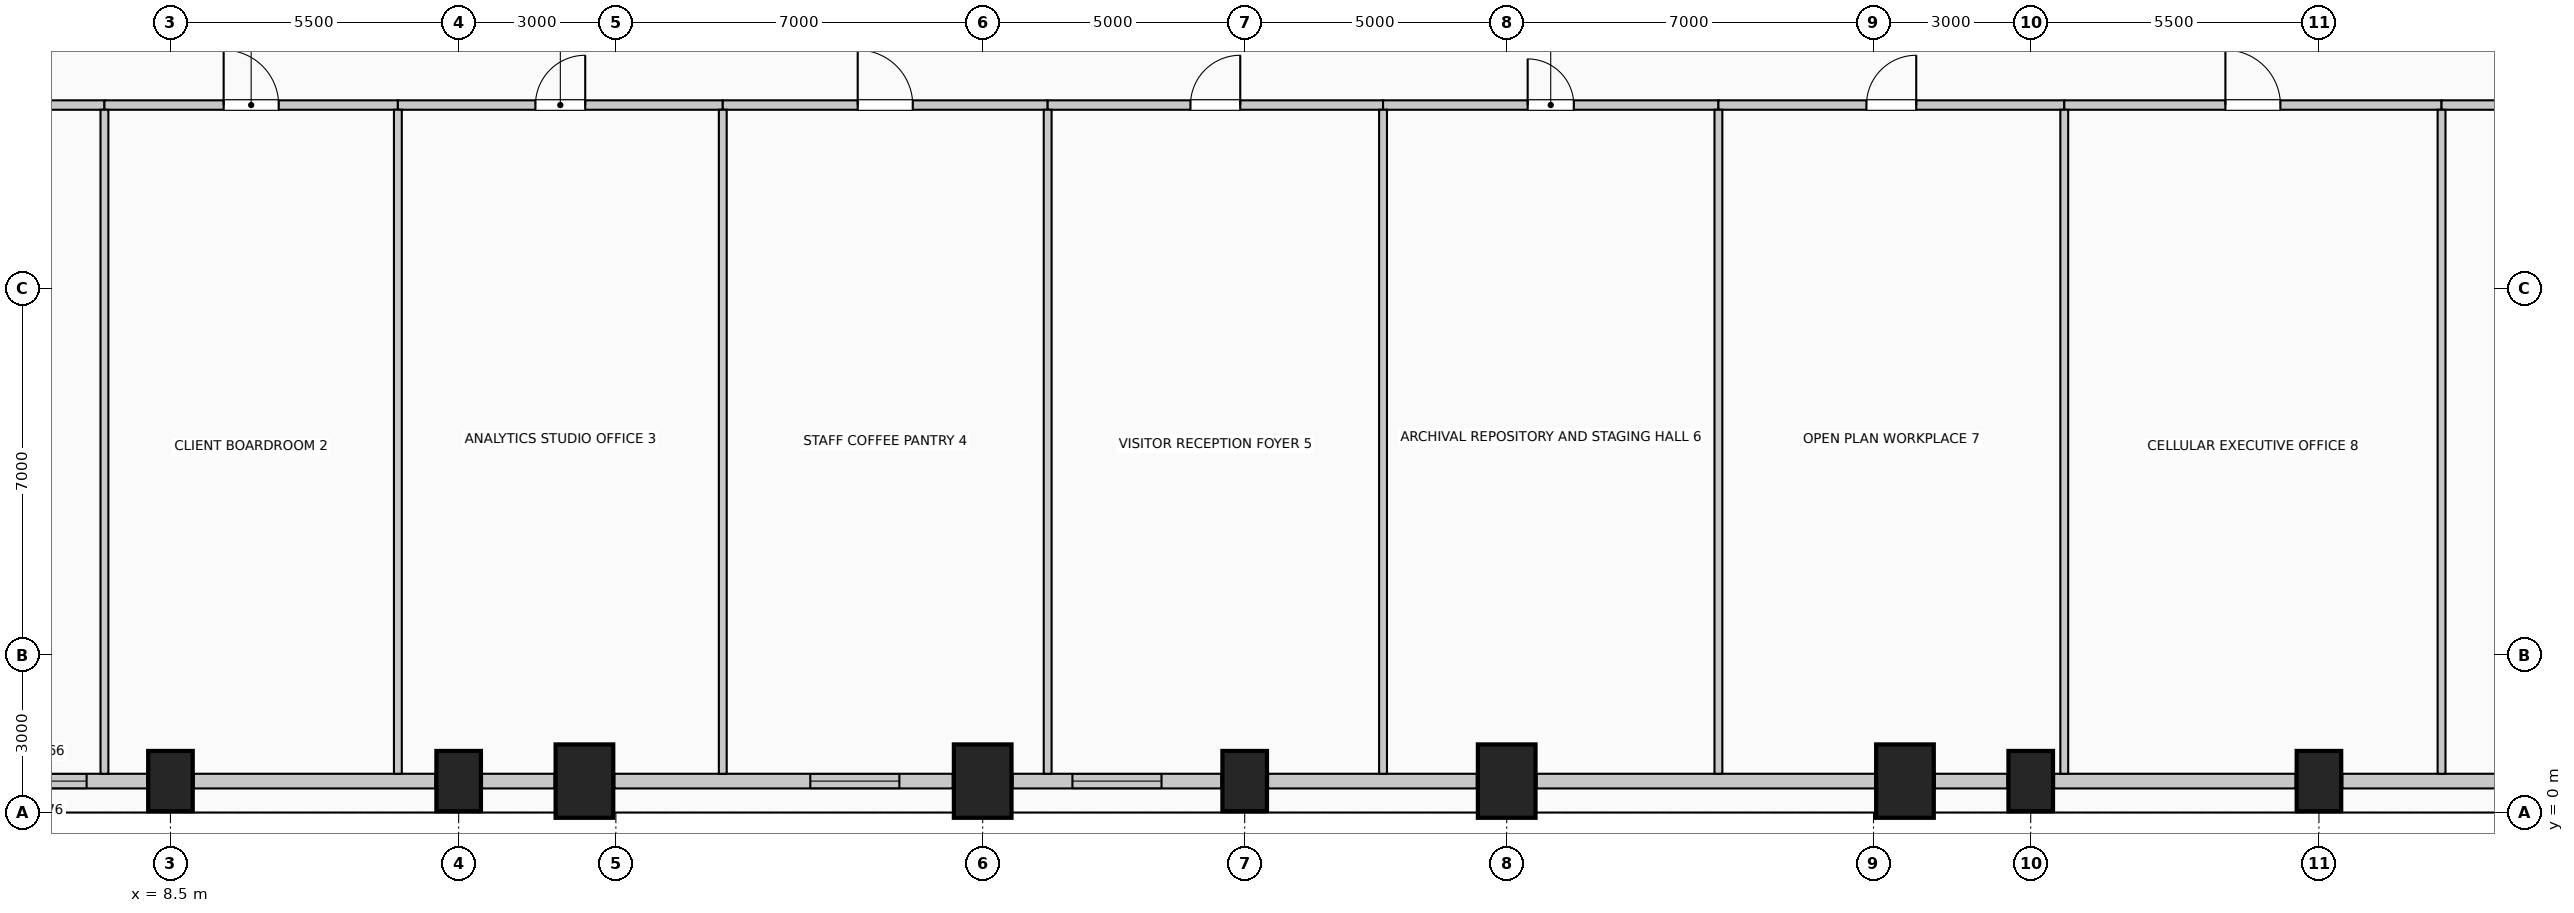
"""IFC4 building model, lengths in metres.
Left out: names, types, materials, properties, quantities, classifications, styles, units other than length and angle.
Written with IfcOpenShell. Run it as: python <this file> out.ifc"""

import sys

from ifc_helpers import new_model, si_unit, direction, frame, frame_2d, origin, origin_2d, place, context, subcontext, project, spatial, rectangle, extrude, element, fill, save


model = new_model("IFC4")
c1 = context("Model", 3, precision=1e-05, world=origin(), true_north=direction((0.0, 1.0)))
c2 = subcontext(c1, "Body", "Model", "MODEL_VIEW")
j1 = project(units=[si_unit("LENGTHUNIT", "METRE"), si_unit("PLANEANGLEUNIT", "RADIAN")], contexts=[c1])
p1 = place(None, origin())
s1 = spatial("IfcSite", under=j1, at=p1, CompositionType="ELEMENT")
p2 = place(p1, origin())
s2 = spatial("IfcBuilding", under=s1, at=p2, CompositionType="ELEMENT")
p3 = place(p2, frame((0.0, 0.0, 152.6)))
s3 = spatial("IfcBuildingStorey", under=s2, at=p3, CompositionType="ELEMENT", Elevation=152.6)
for number, where, z_axis, x_axis in (
    (1, (8.5, 0.6, 0.0), (0.0, 0.0, 1.0), (1.0, 0.0, 0.0)),
    (2, (14.0, 0.6, 0.0), (0.0, 0.0, 1.0), (1.0, 0.0, 0.0)),
):
    element("IfcColumn", number, at=place(p3, frame(where, z_axis=z_axis, x_axis=x_axis)), inside=s3, PredefinedType="COLUMN", context=c2, shape_type="SweptSolid", body=[
        extrude(rectangle(XDim=0.85, YDim=1.15, at=origin_2d()), origin(), (0.0, 0.0, 1.0), 4.0),
    ])
for number, where, z_axis, x_axis in (
    (3, (16.4, 0.6, 0.0), (0.0, 0.0, 1.0), (1.0, 0.0, 0.0)),
    (4, (24.0, 0.6, 0.0), (0.0, 0.0, 1.0), (1.0, 0.0, 0.0)),
):
    element("IfcColumn", number, at=place(p3, frame(where, z_axis=z_axis, x_axis=x_axis)), inside=s3, PredefinedType="COLUMN", context=c2, shape_type="SweptSolid", body=[
        extrude(rectangle(XDim=1.1, YDim=1.4, at=origin_2d()), origin(), (0.0, 0.0, 1.0), 4.0),
    ])
p4 = place(p3, frame((29.0, 0.6, 0.0), z_axis=(0.0, 0.0, 1.0), x_axis=(1.0, 0.0, 0.0)))
e5 = element("IfcColumn", 5, at=p4, inside=s3, PredefinedType="COLUMN", context=c2, shape_type="SweptSolid", body=[
    extrude(rectangle(XDim=0.85, YDim=1.15, at=origin_2d()), origin(), (0.0, 0.0, 1.0), 4.0),
])
for number, where, z_axis, x_axis in (
    (6, (34.0, 0.6, 0.0), (0.0, 0.0, 1.0), (1.0, 0.0, 0.0)),
    (7, (41.6, 0.6, 0.0), (0.0, 0.0, 1.0), (1.0, 0.0, 0.0)),
):
    element("IfcColumn", number, at=place(p3, frame(where, z_axis=z_axis, x_axis=x_axis)), inside=s3, PredefinedType="COLUMN", context=c2, shape_type="SweptSolid", body=[
        extrude(rectangle(XDim=1.1, YDim=1.4, at=origin_2d()), origin(), (0.0, 0.0, 1.0), 4.0),
    ])
for number, where, z_axis, x_axis in (
    (8, (44.0, 0.6, 0.0), (0.0, 0.0, 1.0), (1.0, 0.0, 0.0)),
    (9, (49.5, 0.6, 0.0), (0.0, 0.0, 1.0), (1.0, 0.0, 0.0)),
):
    element("IfcColumn", number, at=place(p3, frame(where, z_axis=z_axis, x_axis=x_axis)), inside=s3, PredefinedType="COLUMN", context=c2, shape_type="SweptSolid", body=[
        extrude(rectangle(XDim=0.85, YDim=1.15, at=origin_2d()), origin(), (0.0, 0.0, 1.0), 4.0),
    ])
p5 = place(p3, frame((8.055, 0.6, 0.0), z_axis=(0.0, 0.0, 1.0), x_axis=(-1.0, 0.0, 0.0)))
e10 = element("IfcWall", 10, at=p5, inside=s3, PredefinedType="SOLIDWALL", context=c2, shape_type="SweptSolid", body=[
    extrude(rectangle(XDim=4.01, YDim=0.28, at=frame_2d((2.005, 0.0))), origin(), (0.0, 0.0, 1.0), 2.875),
])
p6 = place(p5, frame((1.155, 0.0, 0.5)))
e11 = element("IfcOpeningElement", 11, at=p6, cuts=e10, PredefinedType="OPENING", context=c2, shape_type="SweptSolid", body=[
    extrude(rectangle(XDim=1.7, YDim=1.95, at=frame_2d((0.85, 0.975))), frame((0.0, 0.15, 0.0), z_axis=(0.0, -1.0, 0.0), x_axis=(1.0, 0.0, 0.0)), (0.0, 0.0, 1.0), 0.3),
])
p7 = place(p3, frame((13.555, 0.6, 0.0), z_axis=(0.0, 0.0, 1.0), x_axis=(-1.0, 0.0, 0.0)))
e12 = element("IfcWall", 12, at=p7, inside=s3, PredefinedType="SOLIDWALL", context=c2, shape_type="SweptSolid", body=[
    extrude(rectangle(XDim=4.61, YDim=0.28, at=frame_2d((2.305, 0.0))), origin(), (0.0, 0.0, 1.0), 2.875),
])
p8 = place(p3, frame((15.83, 0.6, 0.0), z_axis=(0.0, 0.0, 1.0), x_axis=(-1.0, 0.0, 0.0)))
e13 = element("IfcWall", 13, at=p8, inside=s3, PredefinedType="SOLIDWALL", context=c2, shape_type="SweptSolid", body=[
    extrude(rectangle(XDim=1.385, YDim=0.28, at=frame_2d((0.692, 0.0))), origin(), (0.0, 0.0, 1.0), 2.875),
])
p9 = place(p3, frame((23.43, 0.6, 0.0), z_axis=(0.0, 0.0, 1.0), x_axis=(-1.0, 0.0, 0.0)))
e14 = element("IfcWall", 14, at=p9, inside=s3, PredefinedType="SOLIDWALL", context=c2, shape_type="SweptSolid", body=[
    extrude(rectangle(XDim=6.46, YDim=0.28, at=frame_2d((3.23, 0.0))), origin(), (0.0, 0.0, 1.0), 2.875),
])
p10 = place(p9, frame((1.02, 0.0, 0.5)))
e15 = element("IfcOpeningElement", 15, at=p10, cuts=e14, PredefinedType="OPENING", context=c2, shape_type="SweptSolid", body=[
    extrude(rectangle(XDim=1.7, YDim=1.95, at=frame_2d((0.85, 0.975))), frame((0.0, 0.15, 0.0), z_axis=(0.0, -1.0, 0.0), x_axis=(1.0, 0.0, 0.0)), (0.0, 0.0, 1.0), 0.3),
])
p11 = place(p3, frame((28.555, 0.6, 0.0), z_axis=(0.0, 0.0, 1.0), x_axis=(-1.0, 0.0, 0.0)))
e16 = element("IfcWall", 16, at=p11, inside=s3, PredefinedType="SOLIDWALL", context=c2, shape_type="SweptSolid", body=[
    extrude(rectangle(XDim=3.985, YDim=0.28, at=frame_2d((1.992, 0.0))), origin(), (0.0, 0.0, 1.0), 2.875),
])
p12 = place(p11, frame((1.143, 0.0, 0.5)))
e17 = element("IfcOpeningElement", 17, at=p12, cuts=e16, PredefinedType="OPENING", context=c2, shape_type="SweptSolid", body=[
    extrude(rectangle(XDim=1.7, YDim=1.95, at=frame_2d((0.85, 0.975))), frame((0.0, 0.15, 0.0), z_axis=(0.0, -1.0, 0.0), x_axis=(1.0, 0.0, 0.0)), (0.0, 0.0, 1.0), 0.3),
])
p13 = place(p3, frame((33.43, 0.6, 0.0), z_axis=(0.0, 0.0, 1.0), x_axis=(-1.0, 0.0, 0.0)))
e18 = element("IfcWall", 18, at=p13, inside=s3, PredefinedType="SOLIDWALL", context=c2, shape_type="SweptSolid", body=[
    extrude(rectangle(XDim=3.985, YDim=0.28, at=frame_2d((1.992, 0.0))), origin(), (0.0, 0.0, 1.0), 2.875),
])
p14 = place(p3, frame((41.03, 0.6, 0.0), z_axis=(0.0, 0.0, 1.0), x_axis=(-1.0, 0.0, 0.0)))
e19 = element("IfcWall", 19, at=p14, inside=s3, PredefinedType="SOLIDWALL", context=c2, shape_type="SweptSolid", body=[
    extrude(rectangle(XDim=6.46, YDim=0.28, at=frame_2d((3.23, 0.0))), origin(), (0.0, 0.0, 1.0), 2.875),
])
p15 = place(p3, frame((43.555, 0.6, 0.0), z_axis=(0.0, 0.0, 1.0), x_axis=(-1.0, 0.0, 0.0)))
e20 = element("IfcWall", 20, at=p15, inside=s3, PredefinedType="SOLIDWALL", context=c2, shape_type="SweptSolid", body=[
    extrude(rectangle(XDim=1.385, YDim=0.28, at=frame_2d((0.692, 0.0))), origin(), (0.0, 0.0, 1.0), 2.875),
])
p16 = place(p3, frame((49.055, 0.6, 0.0), z_axis=(0.0, 0.0, 1.0), x_axis=(-1.0, 0.0, 0.0)))
e21 = element("IfcWall", 21, at=p16, inside=s3, PredefinedType="SOLIDWALL", context=c2, shape_type="SweptSolid", body=[
    extrude(rectangle(XDim=4.61, YDim=0.28, at=frame_2d((2.305, 0.0))), origin(), (0.0, 0.0, 1.0), 2.875),
])
p17 = place(p3, frame((53.955, 0.6, 0.0), z_axis=(0.0, 0.0, 1.0), x_axis=(-1.0, 0.0, 0.0)))
e22 = element("IfcWall", 22, at=p17, inside=s3, PredefinedType="SOLIDWALL", context=c2, shape_type="SweptSolid", body=[
    extrude(rectangle(XDim=4.01, YDim=0.28, at=frame_2d((2.005, 0.0))), origin(), (0.0, 0.0, 1.0), 2.875),
])
p18 = place(p3, frame((0.74, 13.5, 0.0), z_axis=(0.0, 0.0, 1.0), x_axis=(1.0, 0.0, 0.0)))
e23 = element("IfcWall", 23, at=p18, inside=s3, PredefinedType="PARTITIONING", context=c2, shape_type="SweptSolid", body=[
    extrude(rectangle(XDim=6.5, YDim=0.18, at=frame_2d((3.25, 0.0))), origin(), (0.0, 0.0, 1.0), 3.725),
])
p19 = place(p18, frame((2.775, 0.0, 0.0)))
e24 = element("IfcOpeningElement", 24, at=p19, cuts=e23, PredefinedType="OPENING", context=c2, shape_type="SweptSolid", body=[
    extrude(rectangle(XDim=0.95, YDim=2.15, at=frame_2d((0.475, 1.075))), frame((0.0, 0.1, 0.0), z_axis=(0.0, -1.0, 0.0), x_axis=(1.0, 0.0, 0.0)), (0.0, 0.0, 1.0), 0.2),
])
p20 = place(p3, frame((7.24, 13.5, 0.0), z_axis=(0.0, 0.0, 1.0), x_axis=(1.0, 0.0, 0.0)))
e25 = element("IfcWall", 25, at=p20, inside=s3, PredefinedType="PARTITIONING", context=c2, shape_type="SweptSolid", body=[
    extrude(rectangle(XDim=5.6, YDim=0.18, at=frame_2d((2.8, 0.0))), origin(), (0.0, 0.0, 1.0), 3.725),
])
p21 = place(p20, frame((2.275, 0.0, 0.0)))
e26 = element("IfcOpeningElement", 26, at=p21, cuts=e25, PredefinedType="OPENING", context=c2, shape_type="SweptSolid", body=[
    extrude(rectangle(XDim=1.05, YDim=2.15, at=frame_2d((0.525, 1.075))), frame((0.0, 0.1, 0.0), z_axis=(0.0, -1.0, 0.0), x_axis=(1.0, 0.0, 0.0)), (0.0, 0.0, 1.0), 0.2),
])
p22 = place(p3, frame((12.84, 13.5, 0.0), z_axis=(0.0, 0.0, 1.0), x_axis=(1.0, 0.0, 0.0)))
e27 = element("IfcWall", 27, at=p22, inside=s3, PredefinedType="PARTITIONING", context=c2, shape_type="SweptSolid", body=[
    extrude(rectangle(XDim=6.2, YDim=0.18, at=frame_2d((3.1, 0.0))), origin(), (0.0, 0.0, 1.0), 3.725),
])
p23 = place(p22, frame((2.625, 0.0, 0.0)))
e28 = element("IfcOpeningElement", 28, at=p23, cuts=e27, PredefinedType="OPENING", context=c2, shape_type="SweptSolid", body=[
    extrude(rectangle(XDim=0.95, YDim=2.15, at=frame_2d((0.475, 1.075))), frame((0.0, 0.1, 0.0), z_axis=(0.0, -1.0, 0.0), x_axis=(1.0, 0.0, 0.0)), (0.0, 0.0, 1.0), 0.2),
])
p24 = place(p3, frame((19.04, 13.5, 0.0), z_axis=(0.0, 0.0, 1.0), x_axis=(1.0, 0.0, 0.0)))
e29 = element("IfcWall", 29, at=p24, inside=s3, PredefinedType="PARTITIONING", context=c2, shape_type="SweptSolid", body=[
    extrude(rectangle(XDim=6.2, YDim=0.18, at=frame_2d((3.1, 0.0))), origin(), (0.0, 0.0, 1.0), 3.725),
])
p25 = place(p24, frame((2.575, 0.0, 0.0)))
e30 = element("IfcOpeningElement", 30, at=p25, cuts=e29, PredefinedType="OPENING", context=c2, shape_type="SweptSolid", body=[
    extrude(rectangle(XDim=1.05, YDim=2.15, at=frame_2d((0.525, 1.075))), frame((0.0, 0.1, 0.0), z_axis=(0.0, -1.0, 0.0), x_axis=(1.0, 0.0, 0.0)), (0.0, 0.0, 1.0), 0.2),
])
p26 = place(p3, frame((25.24, 13.5, 0.0), z_axis=(0.0, 0.0, 1.0), x_axis=(1.0, 0.0, 0.0)))
e31 = element("IfcWall", 31, at=p26, inside=s3, PredefinedType="PARTITIONING", context=c2, shape_type="SweptSolid", body=[
    extrude(rectangle(XDim=6.4, YDim=0.18, at=frame_2d((3.2, 0.0))), origin(), (0.0, 0.0, 1.0), 3.725),
])
p27 = place(p26, frame((2.725, 0.0, 0.0)))
e32 = element("IfcOpeningElement", 32, at=p27, cuts=e31, PredefinedType="OPENING", context=c2, shape_type="SweptSolid", body=[
    extrude(rectangle(XDim=0.95, YDim=2.15, at=frame_2d((0.475, 1.075))), frame((0.0, 0.1, 0.0), z_axis=(0.0, -1.0, 0.0), x_axis=(1.0, 0.0, 0.0)), (0.0, 0.0, 1.0), 0.2),
])
p28 = place(p3, frame((31.64, 13.5, 0.0), z_axis=(0.0, 0.0, 1.0), x_axis=(1.0, 0.0, 0.0)))
e33 = element("IfcWall", 33, at=p28, inside=s3, PredefinedType="PARTITIONING", context=c2, shape_type="SweptSolid", body=[
    extrude(rectangle(XDim=6.4, YDim=0.18, at=frame_2d((3.2, 0.0))), origin(), (0.0, 0.0, 1.0), 3.725),
])
p29 = place(p28, frame((2.76, 0.0, 0.0)))
e34 = element("IfcOpeningElement", 34, at=p29, cuts=e33, PredefinedType="OPENING", context=c2, shape_type="SweptSolid", body=[
    extrude(rectangle(XDim=0.88, YDim=2.1, at=frame_2d((0.44, 1.05))), frame((0.0, 0.1, 0.0), z_axis=(0.0, -1.0, 0.0), x_axis=(1.0, 0.0, 0.0)), (0.0, 0.0, 1.0), 0.2),
])
p30 = place(p3, frame((38.04, 13.5, 0.0), z_axis=(0.0, 0.0, 1.0), x_axis=(1.0, 0.0, 0.0)))
e35 = element("IfcWall", 35, at=p30, inside=s3, PredefinedType="PARTITIONING", context=c2, shape_type="SweptSolid", body=[
    extrude(rectangle(XDim=6.6, YDim=0.18, at=frame_2d((3.3, 0.0))), origin(), (0.0, 0.0, 1.0), 3.725),
])
p31 = place(p30, frame((2.825, 0.0, 0.0)))
e36 = element("IfcOpeningElement", 36, at=p31, cuts=e35, PredefinedType="OPENING", context=c2, shape_type="SweptSolid", body=[
    extrude(rectangle(XDim=0.95, YDim=2.15, at=frame_2d((0.475, 1.075))), frame((0.0, 0.1, 0.0), z_axis=(0.0, -1.0, 0.0), x_axis=(1.0, 0.0, 0.0)), (0.0, 0.0, 1.0), 0.2),
])
p32 = place(p3, frame((44.64, 13.5, 0.0), z_axis=(0.0, 0.0, 1.0), x_axis=(1.0, 0.0, 0.0)))
e37 = element("IfcWall", 37, at=p32, inside=s3, PredefinedType="PARTITIONING", context=c2, shape_type="SweptSolid", body=[
    extrude(rectangle(XDim=7.2, YDim=0.18, at=frame_2d((3.6, 0.0))), origin(), (0.0, 0.0, 1.0), 3.725),
])
p33 = place(p32, frame((3.075, 0.0, 0.0)))
e38 = element("IfcOpeningElement", 38, at=p33, cuts=e37, PredefinedType="OPENING", context=c2, shape_type="SweptSolid", body=[
    extrude(rectangle(XDim=1.05, YDim=2.15, at=frame_2d((0.525, 1.075))), frame((0.0, 0.1, 0.0), z_axis=(0.0, -1.0, 0.0), x_axis=(1.0, 0.0, 0.0)), (0.0, 0.0, 1.0), 0.2),
])
p34 = place(p3, frame((51.84, 13.5, 0.0), z_axis=(0.0, 0.0, 1.0), x_axis=(1.0, 0.0, 0.0)))
e39 = element("IfcWall", 39, at=p34, inside=s3, PredefinedType="PARTITIONING", context=c2, shape_type="SweptSolid", body=[
    extrude(rectangle(XDim=5.42, YDim=0.18, at=frame_2d((2.71, 0.0))), origin(), (0.0, 0.0, 1.0), 3.725),
])
p35 = place(p34, frame((2.235, 0.0, 0.0)))
e40 = element("IfcOpeningElement", 40, at=p35, cuts=e39, PredefinedType="OPENING", context=c2, shape_type="SweptSolid", body=[
    extrude(rectangle(XDim=0.95, YDim=2.15, at=frame_2d((0.475, 1.075))), frame((0.0, 0.1, 0.0), z_axis=(0.0, -1.0, 0.0), x_axis=(1.0, 0.0, 0.0)), (0.0, 0.0, 1.0), 0.2),
])
for number, where, z_axis, x_axis in (
    (41, (7.24, 0.74, 0.0), (0.0, 0.0, 1.0), (0.0, 1.0, 0.0)),
    (42, (12.84, 0.74, 0.0), (0.0, 0.0, 1.0), (0.0, 1.0, 0.0)),
    (43, (19.04, 0.74, 0.0), (0.0, 0.0, 1.0), (0.0, 1.0, 0.0)),
    (44, (25.24, 0.74, 0.0), (0.0, 0.0, 1.0), (0.0, 1.0, 0.0)),
    (45, (31.64, 0.74, 0.0), (0.0, 0.0, 1.0), (0.0, 1.0, 0.0)),
    (46, (38.04, 0.74, 0.0), (0.0, 0.0, 1.0), (0.0, 1.0, 0.0)),
    (47, (44.64, 0.74, 0.0), (0.0, 0.0, 1.0), (0.0, 1.0, 0.0)),
    (48, (51.84, 0.74, 0.0), (0.0, 0.0, 1.0), (0.0, 1.0, 0.0)),
):
    element("IfcWall", number, at=place(p3, frame(where, z_axis=z_axis, x_axis=x_axis)), inside=s3, PredefinedType="PARTITIONING", context=c2, shape_type="SweptSolid", body=[
        extrude(rectangle(XDim=12.67, YDim=0.15, at=frame_2d((6.335, 0.0))), origin(), (0.0, 0.0, 1.0), 3.725),
    ])
p36 = place(p6, origin())
e49 = element("IfcWindow", 49, at=p36, inside=s3, PartitioningType="SINGLE_PANEL", PredefinedType="WINDOW", context=c2, shape_type="SweptSolid", body=[
    extrude(rectangle(XDim=1.7, YDim=1.95, at=frame_2d((0.85, 0.975))), frame((0.0, 0.03, 0.0), z_axis=(0.0, -1.0, 0.0), x_axis=(1.0, 0.0, 0.0)), (0.0, 0.0, 1.0), 0.06),
])
fill(e11, e49)
p37 = place(p10, origin())
e50 = element("IfcWindow", 50, at=p37, inside=s3, PartitioningType="SINGLE_PANEL", PredefinedType="WINDOW", context=c2, shape_type="SweptSolid", body=[
    extrude(rectangle(XDim=1.7, YDim=1.95, at=frame_2d((0.85, 0.975))), frame((0.0, 0.03, 0.0), z_axis=(0.0, -1.0, 0.0), x_axis=(1.0, 0.0, 0.0)), (0.0, 0.0, 1.0), 0.06),
])
fill(e15, e50)
p38 = place(p12, origin())
e51 = element("IfcWindow", 51, at=p38, inside=s3, PartitioningType="SINGLE_PANEL", PredefinedType="WINDOW", context=c2, shape_type="SweptSolid", body=[
    extrude(rectangle(XDim=1.7, YDim=1.95, at=frame_2d((0.85, 0.975))), frame((0.0, 0.03, 0.0), z_axis=(0.0, -1.0, 0.0), x_axis=(1.0, 0.0, 0.0)), (0.0, 0.0, 1.0), 0.06),
])
fill(e17, e51)
p39 = place(p21, origin())
e52 = element("IfcDoor", 52, at=p39, inside=s3, OperationType="SINGLE_SWING_LEFT", PredefinedType="DOOR", context=c2, shape_type="SweptSolid", body=[
    extrude(rectangle(XDim=1.05, YDim=2.15, at=frame_2d((0.525, 1.075))), frame((0.0, 0.025, 0.0), z_axis=(0.0, -1.0, 0.0), x_axis=(1.0, 0.0, 0.0)), (0.0, 0.0, 1.0), 0.05),
])
fill(e26, e52)
p40 = place(p23, origin())
e53 = element("IfcDoor", 53, at=p40, inside=s3, OperationType="SINGLE_SWING_RIGHT", PredefinedType="DOOR", context=c2, shape_type="SweptSolid", body=[
    extrude(rectangle(XDim=0.95, YDim=2.15, at=frame_2d((0.475, 1.075))), frame((0.0, 0.025, 0.0), z_axis=(0.0, -1.0, 0.0), x_axis=(1.0, 0.0, 0.0)), (0.0, 0.0, 1.0), 0.05),
])
fill(e28, e53)
p41 = place(p25, origin())
e54 = element("IfcDoor", 54, at=p41, inside=s3, OperationType="SINGLE_SWING_LEFT", PredefinedType="DOOR", context=c2, shape_type="SweptSolid", body=[
    extrude(rectangle(XDim=1.05, YDim=2.15, at=frame_2d((0.525, 1.075))), frame((0.0, 0.025, 0.0), z_axis=(0.0, -1.0, 0.0), x_axis=(1.0, 0.0, 0.0)), (0.0, 0.0, 1.0), 0.05),
])
fill(e30, e54)
p42 = place(p27, origin())
e55 = element("IfcDoor", 55, at=p42, inside=s3, OperationType="SINGLE_SWING_RIGHT", PredefinedType="DOOR", context=c2, shape_type="SweptSolid", body=[
    extrude(rectangle(XDim=0.95, YDim=2.15, at=frame_2d((0.475, 1.075))), frame((0.0, 0.025, 0.0), z_axis=(0.0, -1.0, 0.0), x_axis=(1.0, 0.0, 0.0)), (0.0, 0.0, 1.0), 0.05),
])
fill(e32, e55)
p43 = place(p29, origin())
e56 = element("IfcDoor", 56, at=p43, inside=s3, OperationType="SINGLE_SWING_LEFT", PredefinedType="DOOR", context=c2, shape_type="SweptSolid", body=[
    extrude(rectangle(XDim=0.88, YDim=2.1, at=frame_2d((0.44, 1.05))), frame((0.0, 0.025, 0.0), z_axis=(0.0, -1.0, 0.0), x_axis=(1.0, 0.0, 0.0)), (0.0, 0.0, 1.0), 0.05),
])
fill(e34, e56)
p44 = place(p31, origin())
e57 = element("IfcDoor", 57, at=p44, inside=s3, OperationType="SINGLE_SWING_RIGHT", PredefinedType="DOOR", context=c2, shape_type="SweptSolid", body=[
    extrude(rectangle(XDim=0.95, YDim=2.15, at=frame_2d((0.475, 1.075))), frame((0.0, 0.025, 0.0), z_axis=(0.0, -1.0, 0.0), x_axis=(1.0, 0.0, 0.0)), (0.0, 0.0, 1.0), 0.05),
])
fill(e36, e57)
p45 = place(p33, origin())
e58 = element("IfcDoor", 58, at=p45, inside=s3, OperationType="SINGLE_SWING_LEFT", PredefinedType="DOOR", context=c2, shape_type="SweptSolid", body=[
    extrude(rectangle(XDim=1.05, YDim=2.15, at=frame_2d((0.525, 1.075))), frame((0.0, 0.025, 0.0), z_axis=(0.0, -1.0, 0.0), x_axis=(1.0, 0.0, 0.0)), (0.0, 0.0, 1.0), 0.05),
])
fill(e38, e58)
save(model, sys.argv[1])
